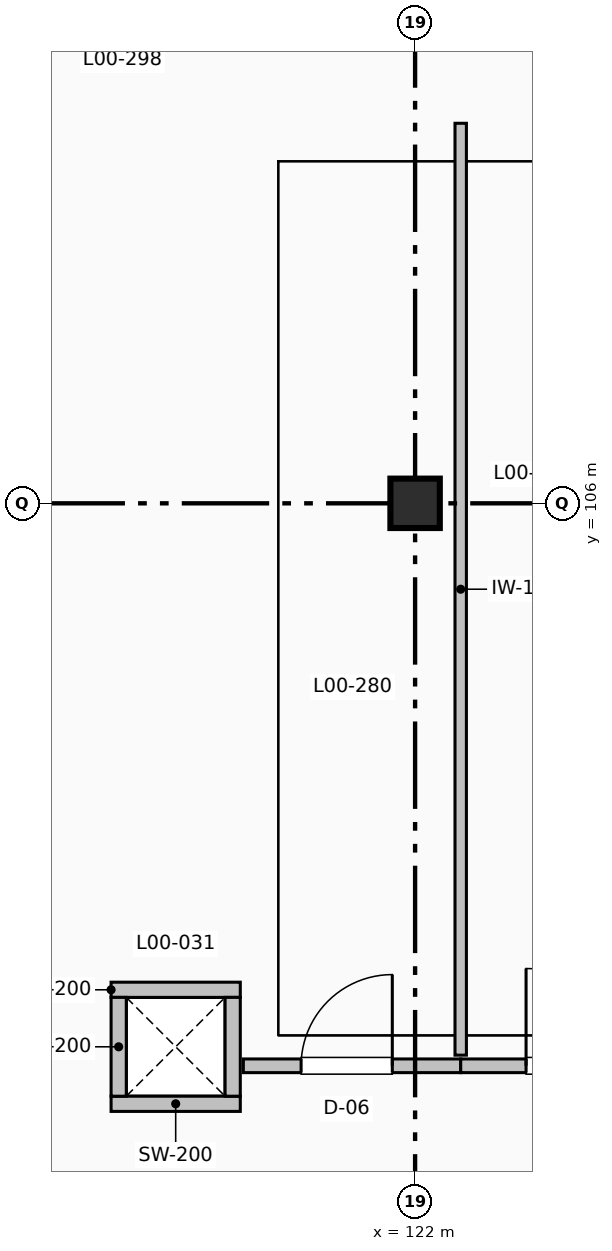
"""IFC4 building model, lengths in metres.
Left out: names, types, materials, properties, quantities, classifications, styles, units other than length and angle.
Written with IfcOpenShell. Run it as: python <this file> out.ifc"""

import sys

from ifc_helpers import new_model, si_unit, direction, frame, frame_2d, origin, origin_2d, place, context, subcontext, project, spatial, rectangle, extrude, element, fill, save


model = new_model("IFC4")
c1 = context("Model", 3, precision=1e-05, world=origin(), true_north=direction((0.0, 1.0)))
c2 = subcontext(c1, "Body", "Model", "MODEL_VIEW")
j1 = project(units=[si_unit("LENGTHUNIT", "METRE"), si_unit("PLANEANGLEUNIT", "RADIAN")], contexts=[c1])
p1 = place(None, origin())
s1 = spatial("IfcSite", under=j1, at=p1, CompositionType="ELEMENT")
p2 = place(p1, origin())
s2 = spatial("IfcBuilding", under=s1, at=p2, CompositionType="ELEMENT")
p3 = place(p2, origin())
s3 = spatial("IfcBuildingStorey", under=s2, at=p3, CompositionType="ELEMENT", Elevation=0.0)
p4 = place(p3, frame((122.0, 106.0, 0.0), z_axis=(0.0, 0.0, 1.0), x_axis=(1.0, 0.0, 0.0)))
e1 = element("IfcColumn", 1, at=p4, inside=s3, PredefinedType="COLUMN", context=c2, shape_type="SweptSolid", body=[
    extrude(rectangle(XDim=0.65, YDim=0.65, at=origin_2d()), origin(), (0.0, 0.0, 1.0), 5.4),
])
for number, where, z_axis, x_axis in (
    (2, (118.0, 98.1, 0.0), (0.0, 0.0, 1.0), (1.0, 0.0, 0.0)),
    (3, (119.7, 99.6, 0.0), (0.0, 0.0, 1.0), (-1.0, 0.0, 0.0)),
):
    element("IfcWall", number, at=place(p3, frame(where, z_axis=z_axis, x_axis=x_axis)), inside=s3, PredefinedType="PARTITIONING", context=c2, shape_type="SweptSolid", body=[
        extrude(rectangle(XDim=1.7, YDim=0.2, at=frame_2d((0.85, 0.0))), origin(), (0.0, 0.0, 1.0), 5.1),
    ])
for number, where, z_axis, x_axis in (
    (4, (118.1, 98.2, 0.0), (0.0, 0.0, 1.0), (0.0, 1.0, 0.0)),
    (5, (119.6, 99.5, 0.0), (0.0, 0.0, 1.0), (0.0, -1.0, 0.0)),
):
    element("IfcWall", number, at=place(p3, frame(where, z_axis=z_axis, x_axis=x_axis)), inside=s3, PredefinedType="PARTITIONING", context=c2, shape_type="SweptSolid", body=[
        extrude(rectangle(XDim=1.3, YDim=0.2, at=frame_2d((0.65, 0.0))), origin(), (0.0, 0.0, 1.0), 5.1),
    ])
p5 = place(p3, frame((119.74, 98.6, 0.0), z_axis=(0.0, 0.0, 1.0), x_axis=(1.0, 0.0, 0.0)))
e6 = element("IfcWall", 6, at=p5, inside=s3, PredefinedType="PARTITIONING", context=c2, shape_type="SweptSolid", body=[
    extrude(rectangle(XDim=2.86, YDim=0.18, at=frame_2d((1.43, 0.0))), origin(), (0.0, 0.0, 1.0), 5.092),
])
p6 = place(p5, frame((0.76, 0.0, 0.0)))
e7 = element("IfcOpeningElement", 7, at=p6, cuts=e6, PredefinedType="OPENING", context=c2, shape_type="SweptSolid", body=[
    extrude(rectangle(XDim=1.2, YDim=2.1, at=frame_2d((0.6, 1.05))), frame((0.0, 0.1, 0.0), z_axis=(0.0, -1.0, 0.0), x_axis=(1.0, 0.0, 0.0)), (0.0, 0.0, 1.0), 0.2),
])
p7 = place(p3, frame((122.6, 98.74, 0.0), z_axis=(0.0, 0.0, 1.0), x_axis=(0.0, 1.0, 0.0)))
e8 = element("IfcWall", 8, at=p7, inside=s3, PredefinedType="PARTITIONING", context=c2, shape_type="SweptSolid", body=[
    extrude(rectangle(XDim=12.26, YDim=0.15, at=frame_2d((6.13, 0.0))), origin(), (0.0, 0.0, 1.0), 5.092),
])
p8 = place(p3, frame((122.6, 98.6, 0.0), z_axis=(0.0, 0.0, 1.0), x_axis=(1.0, 0.0, 0.0)))
e9 = element("IfcWall", 9, at=p8, inside=s3, PredefinedType="PARTITIONING", context=c2, shape_type="SweptSolid", body=[
    extrude(rectangle(XDim=3.0, YDim=0.18, at=frame_2d((1.5, 0.0))), origin(), (0.0, 0.0, 1.0), 5.092),
])
p9 = place(p8, frame((0.86, 0.0, 0.0)))
e10 = element("IfcOpeningElement", 10, at=p9, cuts=e9, PredefinedType="OPENING", context=c2, shape_type="SweptSolid", body=[
    extrude(rectangle(XDim=1.28, YDim=2.14, at=frame_2d((0.64, 1.07))), frame((0.0, 0.1, 0.0), z_axis=(0.0, -1.0, 0.0), x_axis=(1.0, 0.0, 0.0)), (0.0, 0.0, 1.0), 0.2),
])
p10 = place(p6, origin())
e11 = element("IfcDoor", 11, at=p10, inside=s3, OperationType="SINGLE_SWING_RIGHT", PredefinedType="DOOR", context=c2, shape_type="SweptSolid", body=[
    extrude(rectangle(XDim=1.2, YDim=2.1, at=frame_2d((0.6, 1.05))), frame((0.0, 0.025, 0.0), z_axis=(0.0, -1.0, 0.0), x_axis=(1.0, 0.0, 0.0)), (0.0, 0.0, 1.0), 0.05),
])
fill(e7, e11)
p11 = place(p9, origin())
e12 = element("IfcDoor", 12, at=p11, inside=s3, OperationType="SINGLE_SWING_LEFT", PredefinedType="DOOR", context=c2, shape_type="SweptSolid", body=[
    extrude(rectangle(XDim=1.28, YDim=2.14, at=frame_2d((0.64, 1.07))), frame((0.0, 0.025, 0.0), z_axis=(0.0, -1.0, 0.0), x_axis=(1.0, 0.0, 0.0)), (0.0, 0.0, 1.0), 0.05),
])
fill(e10, e12)
save(model, sys.argv[1])
